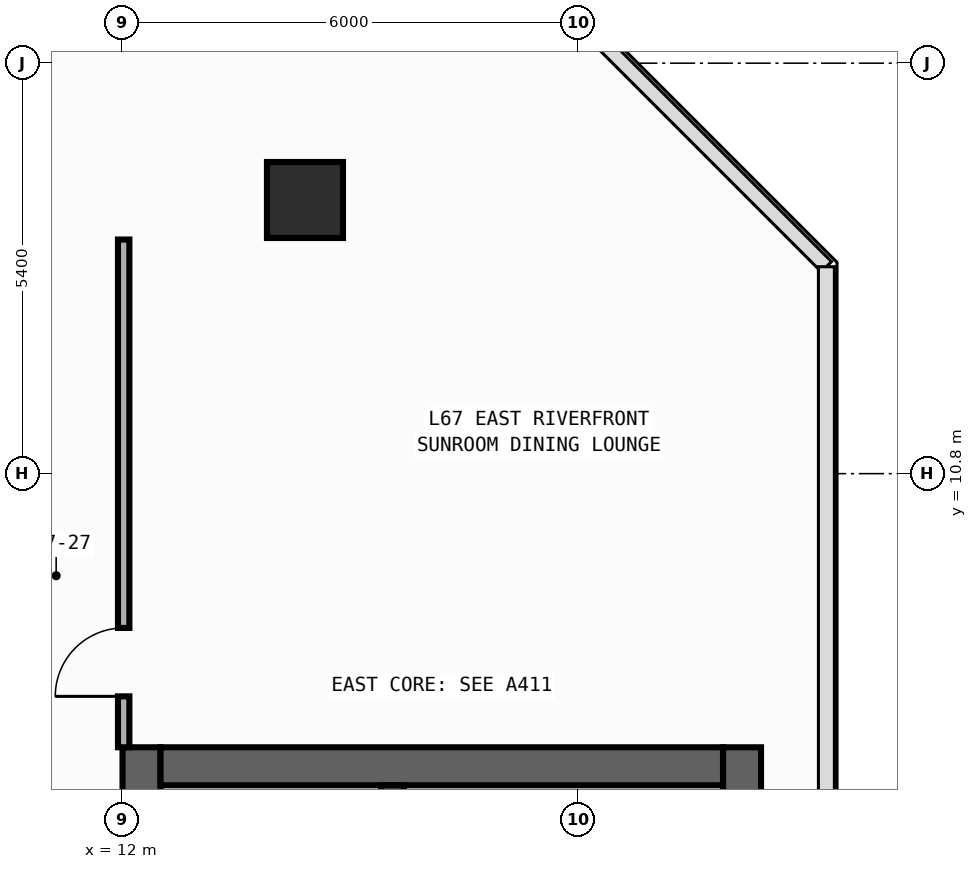
"""IFC4 building model, lengths in metres.
Left out: names, types, materials, properties, quantities, classifications, styles, units other than length and angle.
Written with IfcOpenShell. Run it as: python <this file> out.ifc"""

import sys

from ifc_helpers import new_model, si_unit, direction, frame, frame_2d, origin, origin_2d, place, context, subcontext, project, spatial, rectangle, circle, extrude, element, fill, save


model = new_model("IFC4")
c1 = context("Model", 3, precision=1e-05, world=origin(), true_north=direction((0.0, 1.0)))
c2 = subcontext(c1, "Body", "Model", "MODEL_VIEW")
j1 = project(units=[si_unit("LENGTHUNIT", "METRE"), si_unit("PLANEANGLEUNIT", "RADIAN")], contexts=[c1])
p1 = place(None, origin())
s1 = spatial("IfcSite", under=j1, at=p1, CompositionType="ELEMENT")
p2 = place(p1, origin())
s2 = spatial("IfcBuilding", under=s1, at=p2, CompositionType="ELEMENT")
p3 = place(p2, frame((0.0, 0.0, 281.4)))
s3 = spatial("IfcBuildingStorey", under=s2, at=p3, CompositionType="ELEMENT", Elevation=281.4)
p4 = place(p3, frame((12.25, -19.8, 0.0), z_axis=(0.0, 0.0, 1.0), x_axis=(0.0, 1.0, 0.0)))
e1 = element("IfcWall", 1, at=p4, inside=s3, PredefinedType="SHEAR", context=c2, shape_type="SweptSolid", body=[
    extrude(rectangle(XDim=27.0, YDim=0.5, at=frame_2d((13.5, 0.0))), origin(), (0.0, 0.0, 1.0), 3.54),
])
p5 = place(p4, frame((23.05, 0.0, 0.0)))
e2 = element("IfcOpeningElement", 2, at=p5, cuts=e1, PredefinedType="OPENING", context=c2, shape_type="SweptSolid", body=[
    extrude(rectangle(XDim=1.1, YDim=2.2, at=frame_2d((0.55, 1.1))), frame((0.0, 0.26, 0.0), z_axis=(0.0, -1.0, 0.0), x_axis=(1.0, 0.0, 0.0)), (0.0, 0.0, 1.0), 0.52),
])
p6 = place(p4, frame((19.85, 0.0, 0.0)))
e3 = element("IfcOpeningElement", 3, at=p6, cuts=e1, PredefinedType="OPENING", context=c2, shape_type="SweptSolid", body=[
    extrude(rectangle(XDim=1.1, YDim=2.2, at=frame_2d((0.55, 1.1))), frame((0.0, 0.26, 0.0), z_axis=(0.0, -1.0, 0.0), x_axis=(1.0, 0.0, 0.0)), (0.0, 0.0, 1.0), 0.52),
])
p7 = place(p4, frame((16.65, 0.0, 0.0)))
e4 = element("IfcOpeningElement", 4, at=p7, cuts=e1, PredefinedType="OPENING", context=c2, shape_type="SweptSolid", body=[
    extrude(rectangle(XDim=1.1, YDim=2.2, at=frame_2d((0.55, 1.1))), frame((0.0, 0.26, 0.0), z_axis=(0.0, -1.0, 0.0), x_axis=(1.0, 0.0, 0.0)), (0.0, 0.0, 1.0), 0.52),
])
p8 = place(p4, frame((10.175, 0.0, 0.0)))
e5 = element("IfcOpeningElement", 5, at=p8, cuts=e1, PredefinedType="OPENING", context=c2, shape_type="SweptSolid", body=[
    extrude(rectangle(XDim=0.85, YDim=2.1, at=frame_2d((0.425, 1.05))), frame((0.0, 0.26, 0.0), z_axis=(0.0, -1.0, 0.0), x_axis=(1.0, 0.0, 0.0)), (0.0, 0.0, 1.0), 0.52),
])
p9 = place(p4, frame((12.725, 0.0, 0.0)))
e6 = element("IfcOpeningElement", 6, at=p9, cuts=e1, PredefinedType="OPENING", context=c2, shape_type="SweptSolid", body=[
    extrude(rectangle(XDim=1.15, YDim=2.2, at=frame_2d((0.575, 1.1))), frame((0.0, 0.26, 0.0), z_axis=(0.0, -1.0, 0.0), x_axis=(1.0, 0.0, 0.0)), (0.0, 0.0, 1.0), 0.52),
])
p10 = place(p4, frame((25.125, 0.0, 0.0)))
e7 = element("IfcOpeningElement", 7, at=p10, cuts=e1, PredefinedType="OPENING", context=c2, shape_type="SweptSolid", body=[
    extrude(rectangle(XDim=0.85, YDim=2.1, at=frame_2d((0.425, 1.05))), frame((0.0, 0.26, 0.0), z_axis=(0.0, -1.0, 0.0), x_axis=(1.0, 0.0, 0.0)), (0.0, 0.0, 1.0), 0.52),
])
p11 = place(p3, frame((20.15, -19.8, 0.0), z_axis=(0.0, 0.0, 1.0), x_axis=(0.0, 1.0, 0.0)))
e8 = element("IfcWall", 8, at=p11, inside=s3, PredefinedType="SHEAR", context=c2, shape_type="SweptSolid", body=[
    extrude(rectangle(XDim=27.0, YDim=0.5, at=frame_2d((13.5, 0.0))), origin(), (0.0, 0.0, 1.0), 3.54),
])
p12 = place(p3, frame((12.5, 6.95, 0.0), z_axis=(0.0, 0.0, 1.0), x_axis=(1.0, 0.0, 0.0)))
e9 = element("IfcWall", 9, at=p12, inside=s3, PredefinedType="SHEAR", context=c2, shape_type="SweptSolid", body=[
    extrude(rectangle(XDim=7.4, YDim=0.5, at=frame_2d((3.7, 0.0))), origin(), (0.0, 0.0, 1.0), 3.54),
])
p13 = place(p3, frame((15.55, -19.3, 0.0), z_axis=(0.0, 0.0, 1.0), x_axis=(0.0, 1.0, 0.0)))
e10 = element("IfcWall", 10, at=p13, inside=s3, PredefinedType="SHEAR", context=c2, shape_type="SweptSolid", body=[
    extrude(rectangle(XDim=26.0, YDim=0.3, at=frame_2d((13.0, 0.0))), origin(), (0.0, 0.0, 1.0), 3.54),
])
p14 = place(p13, frame((12.225, 0.0, 0.0)))
e11 = element("IfcOpeningElement", 11, at=p14, cuts=e10, PredefinedType="OPENING", context=c2, shape_type="SweptSolid", body=[
    extrude(rectangle(XDim=1.15, YDim=2.2, at=frame_2d((0.575, 1.1))), frame((0.0, 0.16, 0.0), z_axis=(0.0, -1.0, 0.0), x_axis=(1.0, 0.0, 0.0)), (0.0, 0.0, 1.0), 0.32),
])
p15 = place(p13, frame((24.625, 0.0, 0.0)))
e12 = element("IfcOpeningElement", 12, at=p15, cuts=e10, PredefinedType="OPENING", context=c2, shape_type="SweptSolid", body=[
    extrude(rectangle(XDim=0.85, YDim=2.1, at=frame_2d((0.425, 1.05))), frame((0.0, 0.16, 0.0), z_axis=(0.0, -1.0, 0.0), x_axis=(1.0, 0.0, 0.0)), (0.0, 0.0, 1.0), 0.32),
])
p16 = place(p3, frame((14.4, 14.4, 0.0), z_axis=(0.0, 0.0, 1.0), x_axis=(1.0, 0.0, 0.0)))
e13 = element("IfcColumn", 13, at=p16, inside=s3, PredefinedType="COLUMN", context=c2, shape_type="SweptSolid", body=[
    extrude(circle(Radius=0.5, at=origin_2d()), origin(), (0.0, 0.0, 1.0), 3.8),
])
p17 = place(p3, frame((12.015, 7.2, 0.0), z_axis=(0.0, 0.0, 1.0), x_axis=(0.0, 1.0, 0.0)))
e14 = element("IfcWall", 14, at=p17, inside=s3, PredefinedType="PARTITIONING", context=c2, shape_type="SweptSolid", body=[
    extrude(rectangle(XDim=6.68, YDim=0.15, at=frame_2d((3.34, 0.0))), origin(), (0.0, 0.0, 1.0), 3.54),
])
p18 = place(p17, frame((0.67, 0.0, 0.0)))
e15 = element("IfcOpeningElement", 15, at=p18, cuts=e14, PredefinedType="OPENING", context=c2, shape_type="SweptSolid", body=[
    extrude(rectangle(XDim=0.9, YDim=2.15, at=frame_2d((0.45, 1.075))), frame((0.0, 0.085, 0.0), z_axis=(0.0, -1.0, 0.0), x_axis=(1.0, 0.0, 0.0)), (0.0, 0.0, 1.0), 0.17),
])
p19 = place(p18, origin())
e16 = element("IfcDoor", 16, at=p19, inside=s3, OperationType="SINGLE_SWING_LEFT", PredefinedType="DOOR", context=c2, shape_type="SweptSolid", body=[
    extrude(rectangle(XDim=0.9, YDim=2.15, at=frame_2d((0.45, 1.075))), frame((0.0, 0.025, 0.0), z_axis=(0.0, -1.0, 0.0), x_axis=(1.0, 0.0, 0.0)), (0.0, 0.0, 1.0), 0.05),
])
fill(e15, e16)
save(model, sys.argv[1])
